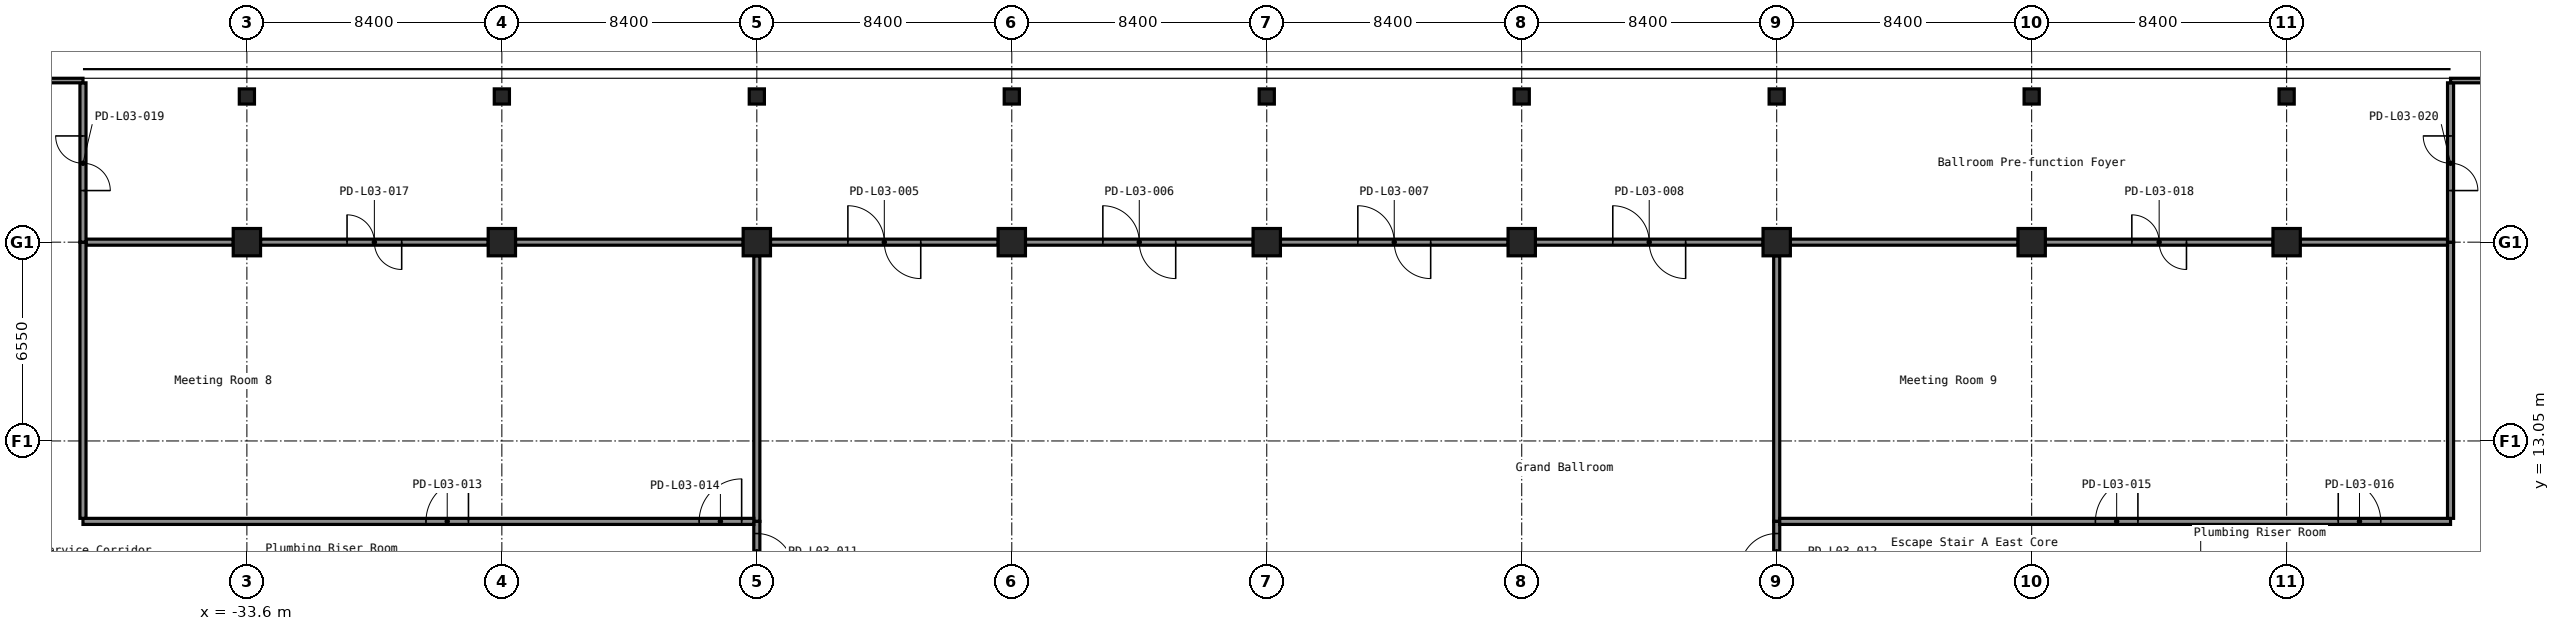
"""IFC4 building model, lengths in metres.
Left out: names, types, materials, properties, quantities, classifications, styles, units other than length and angle.
Written with IfcOpenShell. Run it as: python <this file> out.ifc"""

import sys

from ifc_helpers import new_model, si_unit, direction, frame, frame_2d, origin, origin_2d, place, context, subcontext, project, spatial, rectangle, hollow_rectangle, extrude, element, fill, save


model = new_model("IFC4")
c1 = context("Model", 3, precision=1e-05, world=origin(), true_north=direction((0.0, 1.0)))
c2 = subcontext(c1, "Body", "Model", "MODEL_VIEW")
j1 = project(units=[si_unit("LENGTHUNIT", "METRE"), si_unit("PLANEANGLEUNIT", "RADIAN")], contexts=[c1])
p1 = place(None, origin())
s1 = spatial("IfcSite", under=j1, at=p1, CompositionType="ELEMENT")
p2 = place(p1, origin())
s2 = spatial("IfcBuilding", under=s1, at=p2, CompositionType="ELEMENT")
p3 = place(p2, frame((0.0, 0.0, 15.0)))
s3 = spatial("IfcBuildingStorey", under=s2, at=p3, CompositionType="ELEMENT", Elevation=15.0)
for number, where, z_axis, x_axis in (
    (1, (-33.6, 19.6, 0.0), (0.0, 0.0, 1.0), (1.0, 0.0, 0.0)),
    (2, (-25.2, 19.6, 0.0), (0.0, 0.0, 1.0), (1.0, 0.0, 0.0)),
    (3, (-16.8, 19.6, 0.0), (0.0, 0.0, 1.0), (1.0, 0.0, 0.0)),
    (4, (-8.4, 19.6, 0.0), (0.0, 0.0, 1.0), (1.0, 0.0, 0.0)),
    (5, (0.0, 19.6, 0.0), (0.0, 0.0, 1.0), (1.0, 0.0, 0.0)),
    (6, (8.4, 19.6, 0.0), (0.0, 0.0, 1.0), (1.0, 0.0, 0.0)),
    (7, (16.8, 19.6, 0.0), (0.0, 0.0, 1.0), (1.0, 0.0, 0.0)),
    (8, (25.2, 19.6, 0.0), (0.0, 0.0, 1.0), (1.0, 0.0, 0.0)),
    (9, (33.6, 19.6, 0.0), (0.0, 0.0, 1.0), (1.0, 0.0, 0.0)),
):
    element("IfcColumn", number, at=place(p3, frame(where, z_axis=z_axis, x_axis=x_axis)), inside=s3, PredefinedType="COLUMN", context=c2, shape_type="SweptSolid", body=[
        extrude(hollow_rectangle(XDim=0.9, YDim=0.9, WallThickness=0.036, at=origin_2d()), origin(), (0.0, 0.0, 1.0), 4.4),
    ])
for number, where, z_axis, x_axis in (
    (10, (-33.6, 24.4, 0.0), (0.0, 0.0, 1.0), (1.0, 0.0, 0.0)),
    (11, (-25.2, 24.4, 0.0), (0.0, 0.0, 1.0), (1.0, 0.0, 0.0)),
    (12, (-16.8, 24.4, 0.0), (0.0, 0.0, 1.0), (1.0, 0.0, 0.0)),
    (13, (-8.4, 24.4, 0.0), (0.0, 0.0, 1.0), (1.0, 0.0, 0.0)),
    (14, (0.0, 24.4, 0.0), (0.0, 0.0, 1.0), (1.0, 0.0, 0.0)),
    (15, (8.4, 24.4, 0.0), (0.0, 0.0, 1.0), (1.0, 0.0, 0.0)),
    (16, (16.8, 24.4, 0.0), (0.0, 0.0, 1.0), (1.0, 0.0, 0.0)),
    (17, (25.2, 24.4, 0.0), (0.0, 0.0, 1.0), (1.0, 0.0, 0.0)),
    (18, (33.6, 24.4, 0.0), (0.0, 0.0, 1.0), (1.0, 0.0, 0.0)),
):
    element("IfcColumn", number, at=place(p3, frame(where, z_axis=z_axis, x_axis=x_axis)), inside=s3, PredefinedType="COLUMN", context=c2, shape_type="SweptSolid", body=[
        extrude(hollow_rectangle(XDim=0.5, YDim=0.5, WallThickness=0.019, InnerFilletRadius=0.029, OuterFilletRadius=0.048, at=origin_2d()), origin(), (0.0, 0.0, 1.0), 4.4),
    ])
for number, where, z_axis, x_axis in (
    (19, (16.8, 19.15, 0.0), (0.0, 0.0, 1.0), (0.0, -1.0, 0.0)),
    (20, (-16.8, 10.4, 0.0), (0.0, 0.0, 1.0), (0.0, 1.0, 0.0)),
):
    element("IfcWall", number, at=place(p3, frame(where, z_axis=z_axis, x_axis=x_axis)), inside=s3, PredefinedType="PARTITIONING", context=c2, shape_type="SweptSolid", body=[
        extrude(rectangle(XDim=8.75, YDim=0.2, at=frame_2d((4.375, 0.0))), origin(), (0.0, 0.0, 1.0), 4.4),
    ])
p4 = place(p3, frame((16.8, 8.4, 0.0), z_axis=(0.0, 0.0, 1.0), x_axis=(0.0, 1.0, 0.0)))
e21 = element("IfcWall", 21, at=p4, inside=s3, PredefinedType="PARTITIONING", context=c2, shape_type="SweptSolid", body=[
    extrude(rectangle(XDim=2.0, YDim=0.2, at=frame_2d((1.0, 0.0))), origin(), (0.0, 0.0, 1.0), 4.4),
])
p5 = place(p4, frame((0.4, 0.0, 0.0)))
e22 = element("IfcOpeningElement", 22, at=p5, cuts=e21, PredefinedType="OPENING", context=c2, shape_type="SweptSolid", body=[
    extrude(rectangle(XDim=1.2, YDim=2.1, at=frame_2d((0.6, 1.05))), frame((0.0, 0.11, 0.0), z_axis=(0.0, -1.0, 0.0), x_axis=(1.0, 0.0, 0.0)), (0.0, 0.0, 1.0), 0.22),
])
p6 = place(p3, frame((16.9, 10.4, 0.0), z_axis=(0.0, 0.0, 1.0), x_axis=(1.0, 0.0, 0.0)))
e23 = element("IfcWall", 23, at=p6, inside=s3, PredefinedType="PARTITIONING", context=c2, shape_type="SweptSolid", body=[
    extrude(rectangle(XDim=22.1, YDim=0.2, at=frame_2d((11.05, 0.0))), origin(), (0.0, 0.0, 1.0), 4.4),
])
p7 = place(p6, frame((10.4, 0.0, 0.0)))
e24 = element("IfcOpeningElement", 24, at=p7, cuts=e23, PredefinedType="OPENING", context=c2, shape_type="SweptSolid", body=[
    extrude(rectangle(XDim=1.4, YDim=2.1, at=frame_2d((0.7, 1.05))), frame((0.0, 0.11, 0.0), z_axis=(0.0, -1.0, 0.0), x_axis=(1.0, 0.0, 0.0)), (0.0, 0.0, 1.0), 0.22),
])
p8 = place(p6, frame((18.4, 0.0, 0.0)))
e25 = element("IfcOpeningElement", 25, at=p8, cuts=e23, PredefinedType="OPENING", context=c2, shape_type="SweptSolid", body=[
    extrude(rectangle(XDim=1.4, YDim=2.1, at=frame_2d((0.7, 1.05))), frame((0.0, 0.11, 0.0), z_axis=(0.0, -1.0, 0.0), x_axis=(1.0, 0.0, 0.0)), (0.0, 0.0, 1.0), 0.22),
])
p9 = place(p3, frame((39.0, 10.5, 0.0), z_axis=(0.0, 0.0, 1.0), x_axis=(0.0, 1.0, 0.0)))
e26 = element("IfcWall", 26, at=p9, inside=s3, PredefinedType="PARTITIONING", context=c2, shape_type="SweptSolid", body=[
    extrude(rectangle(XDim=9.1, YDim=0.2, at=frame_2d((4.55, 0.0))), origin(), (0.0, 0.0, 1.0), 4.4),
])
p10 = place(p3, frame((39.0, 19.6, 0.0), z_axis=(0.0, 0.0, 1.0), x_axis=(0.0, 1.0, 0.0)))
e27 = element("IfcWall", 27, at=p10, inside=s3, PredefinedType="PARTITIONING", context=c2, shape_type="SweptSolid", body=[
    extrude(rectangle(XDim=5.25, YDim=0.2, at=frame_2d((2.625, 0.0))), origin(), (0.0, 0.0, 1.0), 4.4),
])
p11 = place(p10, frame((1.7, 0.0, 0.0)))
e28 = element("IfcOpeningElement", 28, at=p11, cuts=e27, PredefinedType="OPENING", context=c2, shape_type="SweptSolid", body=[
    extrude(rectangle(XDim=1.8, YDim=2.1, at=frame_2d((0.9, 1.05))), frame((0.0, 0.11, 0.0), z_axis=(0.0, -1.0, 0.0), x_axis=(1.0, 0.0, 0.0)), (0.0, 0.0, 1.0), 0.22),
])
p12 = place(p3, frame((16.35, 19.6, 0.0), z_axis=(0.0, 0.0, 1.0), x_axis=(-1.0, 0.0, 0.0)))
e29 = element("IfcWall", 29, at=p12, inside=s3, PredefinedType="PARTITIONING", context=c2, shape_type="SweptSolid", body=[
    extrude(rectangle(XDim=7.5, YDim=0.2, at=frame_2d((3.75, 0.0))), origin(), (0.0, 0.0, 1.0), 4.4),
])
p13 = place(p12, frame((2.55, 0.0, 0.0)))
e30 = element("IfcOpeningElement", 30, at=p13, cuts=e29, PredefinedType="OPENING", context=c2, shape_type="SweptSolid", body=[
    extrude(rectangle(XDim=2.4, YDim=2.1, at=frame_2d((1.2, 1.05))), frame((0.0, 0.11, 0.0), z_axis=(0.0, -1.0, 0.0), x_axis=(1.0, 0.0, 0.0)), (0.0, 0.0, 1.0), 0.22),
])
p14 = place(p3, frame((7.95, 19.6, 0.0), z_axis=(0.0, 0.0, 1.0), x_axis=(-1.0, 0.0, 0.0)))
e31 = element("IfcWall", 31, at=p14, inside=s3, PredefinedType="PARTITIONING", context=c2, shape_type="SweptSolid", body=[
    extrude(rectangle(XDim=7.5, YDim=0.2, at=frame_2d((3.75, 0.0))), origin(), (0.0, 0.0, 1.0), 4.4),
])
p15 = place(p14, frame((2.55, 0.0, 0.0)))
e32 = element("IfcOpeningElement", 32, at=p15, cuts=e31, PredefinedType="OPENING", context=c2, shape_type="SweptSolid", body=[
    extrude(rectangle(XDim=2.4, YDim=2.1, at=frame_2d((1.2, 1.05))), frame((0.0, 0.11, 0.0), z_axis=(0.0, -1.0, 0.0), x_axis=(1.0, 0.0, 0.0)), (0.0, 0.0, 1.0), 0.22),
])
p16 = place(p3, frame((-0.45, 19.6, 0.0), z_axis=(0.0, 0.0, 1.0), x_axis=(-1.0, 0.0, 0.0)))
e33 = element("IfcWall", 33, at=p16, inside=s3, PredefinedType="PARTITIONING", context=c2, shape_type="SweptSolid", body=[
    extrude(rectangle(XDim=7.5, YDim=0.2, at=frame_2d((3.75, 0.0))), origin(), (0.0, 0.0, 1.0), 4.4),
])
p17 = place(p16, frame((2.55, 0.0, 0.0)))
e34 = element("IfcOpeningElement", 34, at=p17, cuts=e33, PredefinedType="OPENING", context=c2, shape_type="SweptSolid", body=[
    extrude(rectangle(XDim=2.4, YDim=2.1, at=frame_2d((1.2, 1.05))), frame((0.0, 0.11, 0.0), z_axis=(0.0, -1.0, 0.0), x_axis=(1.0, 0.0, 0.0)), (0.0, 0.0, 1.0), 0.22),
])
p18 = place(p3, frame((-8.85, 19.6, 0.0), z_axis=(0.0, 0.0, 1.0), x_axis=(-1.0, 0.0, 0.0)))
e35 = element("IfcWall", 35, at=p18, inside=s3, PredefinedType="PARTITIONING", context=c2, shape_type="SweptSolid", body=[
    extrude(rectangle(XDim=7.5, YDim=0.2, at=frame_2d((3.75, 0.0))), origin(), (0.0, 0.0, 1.0), 4.4),
])
p19 = place(p18, frame((2.55, 0.0, 0.0)))
e36 = element("IfcOpeningElement", 36, at=p19, cuts=e35, PredefinedType="OPENING", context=c2, shape_type="SweptSolid", body=[
    extrude(rectangle(XDim=2.4, YDim=2.1, at=frame_2d((1.2, 1.05))), frame((0.0, 0.11, 0.0), z_axis=(0.0, -1.0, 0.0), x_axis=(1.0, 0.0, 0.0)), (0.0, 0.0, 1.0), 0.22),
])
p20 = place(p3, frame((38.9, 19.6, 0.0), z_axis=(0.0, 0.0, 1.0), x_axis=(-1.0, 0.0, 0.0)))
e37 = element("IfcWall", 37, at=p20, inside=s3, PredefinedType="PARTITIONING", context=c2, shape_type="SweptSolid", body=[
    extrude(rectangle(XDim=4.85, YDim=0.2, at=frame_2d((2.425, 0.0))), origin(), (0.0, 0.0, 1.0), 4.4),
])
p21 = place(p3, frame((33.15, 19.6, 0.0), z_axis=(0.0, 0.0, 1.0), x_axis=(-1.0, 0.0, 0.0)))
e38 = element("IfcWall", 38, at=p21, inside=s3, PredefinedType="PARTITIONING", context=c2, shape_type="SweptSolid", body=[
    extrude(rectangle(XDim=7.5, YDim=0.2, at=frame_2d((3.75, 0.0))), origin(), (0.0, 0.0, 1.0), 4.4),
])
p22 = place(p21, frame((2.85, 0.0, 0.0)))
e39 = element("IfcOpeningElement", 39, at=p22, cuts=e38, PredefinedType="OPENING", context=c2, shape_type="SweptSolid", body=[
    extrude(rectangle(XDim=1.8, YDim=2.1, at=frame_2d((0.9, 1.05))), frame((0.0, 0.11, 0.0), z_axis=(0.0, -1.0, 0.0), x_axis=(1.0, 0.0, 0.0)), (0.0, 0.0, 1.0), 0.22),
])
for number, where, z_axis, x_axis in (
    (40, (24.75, 19.6, 0.0), (0.0, 0.0, 1.0), (-1.0, 0.0, 0.0)),
    (41, (-17.25, 19.6, 0.0), (0.0, 0.0, 1.0), (-1.0, 0.0, 0.0)),
):
    element("IfcWall", number, at=place(p3, frame(where, z_axis=z_axis, x_axis=x_axis)), inside=s3, PredefinedType="PARTITIONING", context=c2, shape_type="SweptSolid", body=[
        extrude(rectangle(XDim=7.5, YDim=0.2, at=frame_2d((3.75, 0.0))), origin(), (0.0, 0.0, 1.0), 4.4),
    ])
p23 = place(p3, frame((-25.65, 19.6, 0.0), z_axis=(0.0, 0.0, 1.0), x_axis=(-1.0, 0.0, 0.0)))
e42 = element("IfcWall", 42, at=p23, inside=s3, PredefinedType="PARTITIONING", context=c2, shape_type="SweptSolid", body=[
    extrude(rectangle(XDim=7.5, YDim=0.2, at=frame_2d((3.75, 0.0))), origin(), (0.0, 0.0, 1.0), 4.4),
])
p24 = place(p23, frame((2.85, 0.0, 0.0)))
e43 = element("IfcOpeningElement", 43, at=p24, cuts=e42, PredefinedType="OPENING", context=c2, shape_type="SweptSolid", body=[
    extrude(rectangle(XDim=1.8, YDim=2.1, at=frame_2d((0.9, 1.05))), frame((0.0, 0.11, 0.0), z_axis=(0.0, -1.0, 0.0), x_axis=(1.0, 0.0, 0.0)), (0.0, 0.0, 1.0), 0.22),
])
p25 = place(p3, frame((-34.05, 19.6, 0.0), z_axis=(0.0, 0.0, 1.0), x_axis=(-1.0, 0.0, 0.0)))
e44 = element("IfcWall", 44, at=p25, inside=s3, PredefinedType="PARTITIONING", context=c2, shape_type="SweptSolid", body=[
    extrude(rectangle(XDim=4.85, YDim=0.2, at=frame_2d((2.425, 0.0))), origin(), (0.0, 0.0, 1.0), 4.4),
])
p26 = place(p3, frame((-16.8, 10.4, 0.0), z_axis=(0.0, 0.0, 1.0), x_axis=(0.0, -1.0, 0.0)))
e45 = element("IfcWall", 45, at=p26, inside=s3, PredefinedType="PARTITIONING", context=c2, shape_type="SweptSolid", body=[
    extrude(rectangle(XDim=2.0, YDim=0.2, at=frame_2d((1.0, 0.0))), origin(), (0.0, 0.0, 1.0), 4.4),
])
p27 = place(p26, frame((0.4, 0.0, 0.0)))
e46 = element("IfcOpeningElement", 46, at=p27, cuts=e45, PredefinedType="OPENING", context=c2, shape_type="SweptSolid", body=[
    extrude(rectangle(XDim=1.2, YDim=2.1, at=frame_2d((0.6, 1.05))), frame((0.0, 0.11, 0.0), z_axis=(0.0, -1.0, 0.0), x_axis=(1.0, 0.0, 0.0)), (0.0, 0.0, 1.0), 0.22),
])
p28 = place(p3, frame((-39.0, 10.4, 0.0), z_axis=(0.0, 0.0, 1.0), x_axis=(1.0, 0.0, 0.0)))
e47 = element("IfcWall", 47, at=p28, inside=s3, PredefinedType="PARTITIONING", context=c2, shape_type="SweptSolid", body=[
    extrude(rectangle(XDim=22.1, YDim=0.2, at=frame_2d((11.05, 0.0))), origin(), (0.0, 0.0, 1.0), 4.4),
])
p29 = place(p28, frame((11.3, 0.0, 0.0)))
e48 = element("IfcOpeningElement", 48, at=p29, cuts=e47, PredefinedType="OPENING", context=c2, shape_type="SweptSolid", body=[
    extrude(rectangle(XDim=1.4, YDim=2.1, at=frame_2d((0.7, 1.05))), frame((0.0, 0.11, 0.0), z_axis=(0.0, -1.0, 0.0), x_axis=(1.0, 0.0, 0.0)), (0.0, 0.0, 1.0), 0.22),
])
p30 = place(p28, frame((20.3, 0.0, 0.0)))
e49 = element("IfcOpeningElement", 49, at=p30, cuts=e47, PredefinedType="OPENING", context=c2, shape_type="SweptSolid", body=[
    extrude(rectangle(XDim=1.4, YDim=2.1, at=frame_2d((0.7, 1.05))), frame((0.0, 0.11, 0.0), z_axis=(0.0, -1.0, 0.0), x_axis=(1.0, 0.0, 0.0)), (0.0, 0.0, 1.0), 0.22),
])
p31 = place(p3, frame((-39.0, 19.6, 0.0), z_axis=(0.0, 0.0, 1.0), x_axis=(0.0, -1.0, 0.0)))
e50 = element("IfcWall", 50, at=p31, inside=s3, PredefinedType="PARTITIONING", context=c2, shape_type="SweptSolid", body=[
    extrude(rectangle(XDim=9.1, YDim=0.2, at=frame_2d((4.55, 0.0))), origin(), (0.0, 0.0, 1.0), 4.4),
])
p32 = place(p3, frame((-39.0, 24.85, 0.0), z_axis=(0.0, 0.0, 1.0), x_axis=(0.0, -1.0, 0.0)))
e51 = element("IfcWall", 51, at=p32, inside=s3, PredefinedType="PARTITIONING", context=c2, shape_type="SweptSolid", body=[
    extrude(rectangle(XDim=5.25, YDim=0.2, at=frame_2d((2.625, 0.0))), origin(), (0.0, 0.0, 1.0), 4.4),
])
p33 = place(p32, frame((1.75, 0.0, 0.0)))
e52 = element("IfcOpeningElement", 52, at=p33, cuts=e51, PredefinedType="OPENING", context=c2, shape_type="SweptSolid", body=[
    extrude(rectangle(XDim=1.8, YDim=2.1, at=frame_2d((0.9, 1.05))), frame((0.0, 0.11, 0.0), z_axis=(0.0, -1.0, 0.0), x_axis=(1.0, 0.0, 0.0)), (0.0, 0.0, 1.0), 0.22),
])
for number, where, z_axis, x_axis in (
    (53, (-51.98, 24.925, 0.0), (0.0, 0.0, 1.0), (1.0, 0.0, 0.0)),
    (54, (39.0, 24.925, 0.0), (0.0, 0.0, 1.0), (1.0, 0.0, 0.0)),
):
    element("IfcWall", number, at=place(p3, frame(where, z_axis=z_axis, x_axis=x_axis)), inside=s3, PredefinedType="STANDARD", context=c2, shape_type="SweptSolid", body=[
        extrude(rectangle(XDim=12.98, YDim=0.15, at=frame_2d((6.49, 0.0))), origin(), (0.0, 0.0, 1.0), 4.4),
    ])
p34 = place(p19, origin())
e55 = element("IfcDoor", 55, at=p34, inside=s3, OperationType="DOUBLE_DOOR_DOUBLE_SWING", PredefinedType="DOOR", context=c2, shape_type="SweptSolid", body=[
    extrude(rectangle(XDim=2.4, YDim=2.1, at=frame_2d((1.2, 1.05))), frame((0.0, 0.025, 0.0), z_axis=(0.0, -1.0, 0.0), x_axis=(1.0, 0.0, 0.0)), (0.0, 0.0, 1.0), 0.05),
])
fill(e36, e55)
p35 = place(p17, origin())
e56 = element("IfcDoor", 56, at=p35, inside=s3, OperationType="DOUBLE_DOOR_DOUBLE_SWING", PredefinedType="DOOR", context=c2, shape_type="SweptSolid", body=[
    extrude(rectangle(XDim=2.4, YDim=2.1, at=frame_2d((1.2, 1.05))), frame((0.0, 0.025, 0.0), z_axis=(0.0, -1.0, 0.0), x_axis=(1.0, 0.0, 0.0)), (0.0, 0.0, 1.0), 0.05),
])
fill(e34, e56)
p36 = place(p15, origin())
e57 = element("IfcDoor", 57, at=p36, inside=s3, OperationType="DOUBLE_DOOR_DOUBLE_SWING", PredefinedType="DOOR", context=c2, shape_type="SweptSolid", body=[
    extrude(rectangle(XDim=2.4, YDim=2.1, at=frame_2d((1.2, 1.05))), frame((0.0, 0.025, 0.0), z_axis=(0.0, -1.0, 0.0), x_axis=(1.0, 0.0, 0.0)), (0.0, 0.0, 1.0), 0.05),
])
fill(e32, e57)
p37 = place(p13, origin())
e58 = element("IfcDoor", 58, at=p37, inside=s3, OperationType="DOUBLE_DOOR_DOUBLE_SWING", PredefinedType="DOOR", context=c2, shape_type="SweptSolid", body=[
    extrude(rectangle(XDim=2.4, YDim=2.1, at=frame_2d((1.2, 1.05))), frame((0.0, 0.025, 0.0), z_axis=(0.0, -1.0, 0.0), x_axis=(1.0, 0.0, 0.0)), (0.0, 0.0, 1.0), 0.05),
])
fill(e30, e58)
p38 = place(p27, origin())
e59 = element("IfcDoor", 59, at=p38, inside=s3, OperationType="SINGLE_SWING_LEFT", PredefinedType="DOOR", context=c2, shape_type="SweptSolid", body=[
    extrude(rectangle(XDim=1.2, YDim=2.1, at=frame_2d((0.6, 1.05))), frame((0.0, 0.025, 0.0), z_axis=(0.0, -1.0, 0.0), x_axis=(1.0, 0.0, 0.0)), (0.0, 0.0, 1.0), 0.05),
])
fill(e46, e59)
p39 = place(p5, origin())
e60 = element("IfcDoor", 60, at=p39, inside=s3, OperationType="SINGLE_SWING_RIGHT", PredefinedType="DOOR", context=c2, shape_type="SweptSolid", body=[
    extrude(rectangle(XDim=1.2, YDim=2.1, at=frame_2d((0.6, 1.05))), frame((0.0, 0.025, 0.0), z_axis=(0.0, -1.0, 0.0), x_axis=(1.0, 0.0, 0.0)), (0.0, 0.0, 1.0), 0.05),
])
fill(e22, e60)
p40 = place(p29, origin())
e61 = element("IfcDoor", 61, at=p40, inside=s3, OperationType="SINGLE_SWING_LEFT", PredefinedType="DOOR", context=c2, shape_type="SweptSolid", body=[
    extrude(rectangle(XDim=1.4, YDim=2.1, at=frame_2d((0.7, 1.05))), frame((0.0, 0.025, 0.0), z_axis=(0.0, -1.0, 0.0), x_axis=(1.0, 0.0, 0.0)), (0.0, 0.0, 1.0), 0.05),
])
fill(e48, e61)
p41 = place(p30, origin())
e62 = element("IfcDoor", 62, at=p41, inside=s3, OperationType="SINGLE_SWING_LEFT", PredefinedType="DOOR", context=c2, shape_type="SweptSolid", body=[
    extrude(rectangle(XDim=1.4, YDim=2.1, at=frame_2d((0.7, 1.05))), frame((0.0, 0.025, 0.0), z_axis=(0.0, -1.0, 0.0), x_axis=(1.0, 0.0, 0.0)), (0.0, 0.0, 1.0), 0.05),
])
fill(e49, e62)
p42 = place(p7, origin())
e63 = element("IfcDoor", 63, at=p42, inside=s3, OperationType="SINGLE_SWING_LEFT", PredefinedType="DOOR", context=c2, shape_type="SweptSolid", body=[
    extrude(rectangle(XDim=1.4, YDim=2.1, at=frame_2d((0.7, 1.05))), frame((0.0, 0.025, 0.0), z_axis=(0.0, -1.0, 0.0), x_axis=(1.0, 0.0, 0.0)), (0.0, 0.0, 1.0), 0.05),
])
fill(e24, e63)
p43 = place(p8, origin())
e64 = element("IfcDoor", 64, at=p43, inside=s3, OperationType="SINGLE_SWING_RIGHT", PredefinedType="DOOR", context=c2, shape_type="SweptSolid", body=[
    extrude(rectangle(XDim=1.4, YDim=2.1, at=frame_2d((0.7, 1.05))), frame((0.0, 0.025, 0.0), z_axis=(0.0, -1.0, 0.0), x_axis=(1.0, 0.0, 0.0)), (0.0, 0.0, 1.0), 0.05),
])
fill(e25, e64)
p44 = place(p24, origin())
e65 = element("IfcDoor", 65, at=p44, inside=s3, OperationType="DOUBLE_DOOR_DOUBLE_SWING", PredefinedType="DOOR", context=c2, shape_type="SweptSolid", body=[
    extrude(rectangle(XDim=1.8, YDim=2.1, at=frame_2d((0.9, 1.05))), frame((0.0, 0.025, 0.0), z_axis=(0.0, -1.0, 0.0), x_axis=(1.0, 0.0, 0.0)), (0.0, 0.0, 1.0), 0.05),
])
fill(e43, e65)
p45 = place(p22, origin())
e66 = element("IfcDoor", 66, at=p45, inside=s3, OperationType="DOUBLE_DOOR_DOUBLE_SWING", PredefinedType="DOOR", context=c2, shape_type="SweptSolid", body=[
    extrude(rectangle(XDim=1.8, YDim=2.1, at=frame_2d((0.9, 1.05))), frame((0.0, 0.025, 0.0), z_axis=(0.0, -1.0, 0.0), x_axis=(1.0, 0.0, 0.0)), (0.0, 0.0, 1.0), 0.05),
])
fill(e39, e66)
p46 = place(p33, origin())
e67 = element("IfcDoor", 67, at=p46, inside=s3, OperationType="DOUBLE_DOOR_SINGLE_SWING", PredefinedType="DOOR", context=c2, shape_type="SweptSolid", body=[
    extrude(rectangle(XDim=1.8, YDim=2.1, at=frame_2d((0.9, 1.05))), frame((0.0, 0.025, 0.0), z_axis=(0.0, -1.0, 0.0), x_axis=(1.0, 0.0, 0.0)), (0.0, 0.0, 1.0), 0.05),
])
fill(e52, e67)
p47 = place(p11, origin())
e68 = element("IfcDoor", 68, at=p47, inside=s3, OperationType="DOUBLE_DOOR_SINGLE_SWING", PredefinedType="DOOR", context=c2, shape_type="SweptSolid", body=[
    extrude(rectangle(XDim=1.8, YDim=2.1, at=frame_2d((0.9, 1.05))), frame((0.0, 0.025, 0.0), z_axis=(0.0, -1.0, 0.0), x_axis=(1.0, 0.0, 0.0)), (0.0, 0.0, 1.0), 0.05),
])
fill(e28, e68)
save(model, sys.argv[1])
